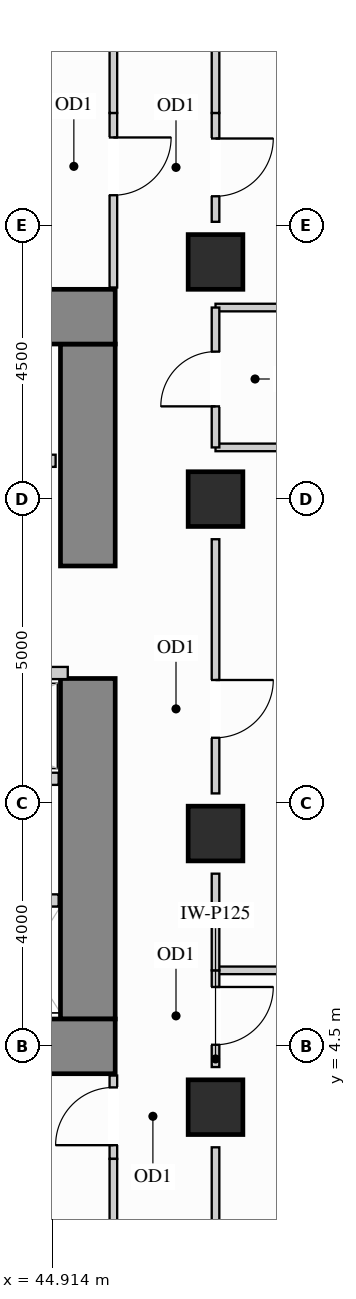
"""IFC4 building model, lengths in metres.
Left out: names, types, materials, properties, quantities, classifications, styles, units other than length and angle.
Written with IfcOpenShell. Run it as: python <this file> out.ifc"""

import sys

from ifc_helpers import new_model, si_unit, direction, frame, frame_2d, origin, origin_2d, place, context, subcontext, project, spatial, rectangle, extrude, source, transform, mapped, element, fill, save


model = new_model("IFC4")
c1 = context("Model", 3, precision=1e-05, world=origin(), true_north=direction((0.0, 1.0)))
c2 = subcontext(c1, "Body", "Model", "MODEL_VIEW")
j1 = project(units=[si_unit("LENGTHUNIT", "METRE"), si_unit("PLANEANGLEUNIT", "RADIAN")], contexts=[c1])
p1 = place(None, origin())
s1 = spatial("IfcSite", under=j1, at=p1, CompositionType="ELEMENT")
p2 = place(p1, origin())
s2 = spatial("IfcBuilding", under=s1, at=p2, CompositionType="ELEMENT")
p3 = place(p2, frame((0.0, 0.0, 54.9)))
s3 = spatial("IfcBuildingStorey", under=s2, at=p3, CompositionType="ELEMENT", Elevation=54.9)
m1 = source(origin(), c2, "Body", "SweptSolid", [
    extrude(rectangle(XDim=0.9, YDim=0.9, at=origin_2d()), origin(), (0.0, 0.0, 1.0), 3.38),
])
for number, where, z_axis, x_axis in (
    (1, (47.6, 13.5, 0.0), (0.0, 0.0, 1.0), (1.0, 0.0, 0.0)),
    (2, (47.6, 3.5, 0.0), (0.0, 0.0, 1.0), (1.0, 0.0, 0.0)),
    (3, (47.6, 8.0, 0.0), (0.0, 0.0, 1.0), (1.0, 0.0, 0.0)),
    (4, (47.6, 17.4, 0.0), (0.0, 0.0, 1.0), (1.0, 0.0, 0.0)),
):
    element("IfcColumn", number, at=place(p3, frame(where, z_axis=z_axis, x_axis=x_axis)), inside=s3, PredefinedType="COLUMN", context=c2, shape_type="MappedRepresentation", body=[
        mapped(m1, transform((0.0, 0.0, 0.0), x_axis=(1.0, 0.0, 0.0), y_axis=(0.0, 1.0, 0.0), z_axis=(0.0, 0.0, 1.0))),
    ])
m2 = source(origin(), c2, "Body", "SweptSolid", [
    extrude(rectangle(XDim=5.6, YDim=0.9, at=frame_2d((2.8, 0.0))), origin(), (0.0, 0.0, 1.0), 3.38),
])
p4 = place(p3, frame((45.5, 4.95, 0.0), z_axis=(0.0, 0.0, 1.0), x_axis=(0.0, 1.0, 0.0)))
e5 = element("IfcWall", 5, at=p4, inside=s3, PredefinedType="SHEAR", context=c2, shape_type="MappedRepresentation", body=[
    mapped(m2, transform((0.0, 0.0, 0.0), x_axis=(1.0, 0.0, 0.0), y_axis=(0.0, 1.0, 0.0), z_axis=(0.0, 0.0, 1.0))),
])
m3 = source(origin(), c2, "Body", "SweptSolid", [
    extrude(rectangle(XDim=3.65, YDim=0.9, at=frame_2d((1.825, 0.0))), origin(), (0.0, 0.0, 1.0), 3.38),
])
p5 = place(p3, frame((45.5, 12.4, 0.0), z_axis=(0.0, 0.0, 1.0), x_axis=(0.0, 1.0, 0.0)))
e6 = element("IfcWall", 6, at=p5, inside=s3, PredefinedType="SHEAR", context=c2, shape_type="MappedRepresentation", body=[
    mapped(m3, transform((0.0, 0.0, 0.0), x_axis=(1.0, 0.0, 0.0), y_axis=(0.0, 1.0, 0.0), z_axis=(0.0, 0.0, 1.0))),
])
m4 = source(origin(), c2, "Body", "SweptSolid", [
    extrude(rectangle(XDim=10.4, YDim=0.9, at=frame_2d((5.2, 0.0))), origin(), (0.0, 0.0, 1.0), 3.38),
])
for number, where, z_axis, x_axis in (
    (7, (35.55, 16.5, 0.0), (0.0, 0.0, 1.0), (1.0, 0.0, 0.0)),
    (8, (35.55, 4.5, 0.0), (0.0, 0.0, 1.0), (1.0, 0.0, 0.0)),
):
    element("IfcWall", number, at=place(p3, frame(where, z_axis=z_axis, x_axis=x_axis)), inside=s3, PredefinedType="SHEAR", context=c2, shape_type="MappedRepresentation", body=[
        mapped(m4, transform((0.0, 0.0, 0.0), x_axis=(1.0, 0.0, 0.0), y_axis=(0.0, 1.0, 0.0), z_axis=(0.0, 0.0, 1.0))),
    ])
m5 = source(origin(), c2, "Body", "SweptSolid", [
    extrude(rectangle(XDim=11.048, YDim=0.125, at=frame_2d((5.524, 0.0))), origin(), (0.0, 0.0, 1.0), 3.365),
])
p6 = place(p3, frame((47.6, 14.35, 0.0), z_axis=(0.0, 0.0, 1.0), x_axis=(1.0, 0.0, 0.0)))
e9 = element("IfcWall", 9, at=p6, inside=s3, PredefinedType="PARTITIONING", context=c2, shape_type="MappedRepresentation", body=[
    mapped(m5, transform((0.0, 0.0, 0.0), x_axis=(1.0, 0.0, 0.0), y_axis=(0.0, 1.0, 0.0), z_axis=(0.0, 0.0, 1.0))),
])
m6 = source(origin(), c2, "Body", "SweptSolid", [
    extrude(rectangle(XDim=11.048, YDim=0.125, at=frame_2d((5.524, 0.0))), origin(), (0.0, 0.0, 1.0), 2.67),
])
p7 = place(p3, frame((47.6, 16.65, 0.0), z_axis=(0.0, 0.0, 1.0), x_axis=(1.0, 0.0, 0.0)))
e10 = element("IfcWall", 10, at=p7, inside=s3, PredefinedType="PARTITIONING", context=c2, shape_type="MappedRepresentation", body=[
    mapped(m6, transform((0.0, 0.0, 0.0), x_axis=(1.0, 0.0, 0.0), y_axis=(0.0, 1.0, 0.0), z_axis=(0.0, 0.0, 1.0))),
])
p8 = place(p3, frame((47.6, 5.75, 0.0), z_axis=(0.0, 0.0, 1.0), x_axis=(1.0, 0.0, 0.0)))
e11 = element("IfcWall", 11, at=p8, inside=s3, PredefinedType="PARTITIONING", context=c2, shape_type="MappedRepresentation", body=[
    mapped(m5, transform((0.0, 0.0, 0.0), x_axis=(1.0, 0.0, 0.0), y_axis=(0.0, 1.0, 0.0), z_axis=(0.0, 0.0, 1.0))),
])
p9 = place(p3, frame((47.6, 4.16, 0.0), z_axis=(0.0, 0.0, 1.0), x_axis=(0.0, 1.0, 0.0)))
e12 = element("IfcWall", 12, at=p9, inside=s3, PredefinedType="PARTITIONING", context=c2, shape_type="SweptSolid", body=[
    extrude(rectangle(XDim=1.59, YDim=0.125, at=frame_2d((0.795, 0.0))), origin(), (0.0, 0.0, 1.0), 2.67),
])
p10 = place(p9, frame((0.367, 0.0, 0.0)))
e13 = element("IfcOpeningElement", 13, at=p10, cuts=e12, PredefinedType="OPENING", context=c2, shape_type="SweptSolid", body=[
    extrude(rectangle(XDim=0.95, YDim=2.15, at=frame_2d((0.475, 1.075))), frame((0.0, 0.073, 0.0), z_axis=(0.0, -1.0, 0.0), x_axis=(1.0, 0.0, 0.0)), (0.0, 0.0, 1.0), 0.145),
])
m7 = source(origin(), c2, "Body", "SweptSolid", [
    extrude(rectangle(XDim=1.58, YDim=0.125, at=frame_2d((0.79, 0.0))), origin(), (0.0, 0.0, 1.0), 2.67),
])
p11 = place(p3, frame((47.6, 1.26, 0.0), z_axis=(0.0, 0.0, 1.0), x_axis=(0.0, 1.0, 0.0)))
e14 = element("IfcWall", 14, at=p11, inside=s3, PredefinedType="PARTITIONING", context=c2, shape_type="MappedRepresentation", body=[
    mapped(m7, transform((0.0, 0.0, 0.0), x_axis=(1.0, 0.0, 0.0), y_axis=(0.0, 1.0, 0.0), z_axis=(0.0, 0.0, 1.0))),
])
m8 = source(origin(), c2, "Body", "SweptSolid", [
    extrude(rectangle(XDim=1.59, YDim=0.125, at=frame_2d((0.795, 0.0))), origin(), (0.0, 0.0, 1.0), 2.67),
])
p12 = place(p3, frame((47.6, 5.75, 0.0), z_axis=(0.0, 0.0, 1.0), x_axis=(0.0, 1.0, 0.0)))
e15 = element("IfcWall", 15, at=p12, inside=s3, PredefinedType="PARTITIONING", context=c2, shape_type="MappedRepresentation", body=[
    mapped(m8, transform((0.0, 0.0, 0.0), x_axis=(1.0, 0.0, 0.0), y_axis=(0.0, 1.0, 0.0), z_axis=(0.0, 0.0, 1.0))),
])
p13 = place(p3, frame((47.6, 8.66, 0.0), z_axis=(0.0, 0.0, 1.0), x_axis=(0.0, 1.0, 0.0)))
e16 = element("IfcWall", 16, at=p13, inside=s3, PredefinedType="PARTITIONING", context=c2, shape_type="SweptSolid", body=[
    extrude(rectangle(XDim=4.18, YDim=0.125, at=frame_2d((2.09, 0.0))), origin(), (0.0, 0.0, 1.0), 2.67),
])
p14 = place(p13, frame((0.915, 0.0, 0.0)))
e17 = element("IfcOpeningElement", 17, at=p14, cuts=e16, PredefinedType="OPENING", context=c2, shape_type="SweptSolid", body=[
    extrude(rectangle(XDim=0.95, YDim=2.15, at=frame_2d((0.475, 1.075))), frame((0.0, 0.073, 0.0), z_axis=(0.0, -1.0, 0.0), x_axis=(1.0, 0.0, 0.0)), (0.0, 0.0, 1.0), 0.145),
])
p15 = place(p3, frame((47.6, 18.06, 0.0), z_axis=(0.0, 0.0, 1.0), x_axis=(0.0, 1.0, 0.0)))
e18 = element("IfcWall", 18, at=p15, inside=s3, PredefinedType="PARTITIONING", context=c2, shape_type="SweptSolid", body=[
    extrude(rectangle(XDim=1.79, YDim=0.125, at=frame_2d((0.895, 0.0))), origin(), (0.0, 0.0, 1.0), 2.67),
])
p16 = place(p15, frame((0.42, 0.0, 0.0)))
e19 = element("IfcOpeningElement", 19, at=p16, cuts=e18, PredefinedType="OPENING", context=c2, shape_type="SweptSolid", body=[
    extrude(rectangle(XDim=0.95, YDim=2.15, at=frame_2d((0.475, 1.075))), frame((0.0, 0.073, 0.0), z_axis=(0.0, -1.0, 0.0), x_axis=(1.0, 0.0, 0.0)), (0.0, 0.0, 1.0), 0.145),
])
m9 = source(origin(), c2, "Body", "SweptSolid", [
    extrude(rectangle(XDim=1.39, YDim=0.125, at=frame_2d((0.695, 0.0))), origin(), (0.0, 0.0, 1.0), 2.67),
])
p17 = place(p3, frame((47.6, 19.85, 0.0), z_axis=(0.0, 0.0, 1.0), x_axis=(0.0, 1.0, 0.0)))
e20 = element("IfcWall", 20, at=p17, inside=s3, PredefinedType="PARTITIONING", context=c2, shape_type="MappedRepresentation", body=[
    mapped(m9, transform((0.0, 0.0, 0.0), x_axis=(1.0, 0.0, 0.0), y_axis=(0.0, 1.0, 0.0), z_axis=(0.0, 0.0, 1.0))),
])
p18 = place(p3, frame((47.6, 14.35, 0.0), z_axis=(0.0, 0.0, 1.0), x_axis=(0.0, 1.0, 0.0)))
e21 = element("IfcWall", 21, at=p18, inside=s3, PredefinedType="PARTITIONING", context=c2, shape_type="SweptSolid", body=[
    extrude(rectangle(XDim=2.3, YDim=0.125, at=frame_2d((1.15, 0.0))), origin(), (0.0, 0.0, 1.0), 2.67),
])
p19 = place(p18, frame((0.675, 0.0, 0.0)))
e22 = element("IfcOpeningElement", 22, at=p19, cuts=e21, PredefinedType="OPENING", context=c2, shape_type="SweptSolid", body=[
    extrude(rectangle(XDim=0.9, YDim=2.15, at=frame_2d((0.45, 1.075))), frame((0.0, 0.073, 0.0), z_axis=(0.0, -1.0, 0.0), x_axis=(1.0, 0.0, 0.0)), (0.0, 0.0, 1.0), 0.145),
])
p20 = place(p3, frame((45.92, 16.98, 0.0), z_axis=(0.0, 0.0, 1.0), x_axis=(0.0, 1.0, 0.0)))
e23 = element("IfcWall", 23, at=p20, inside=s3, PredefinedType="PARTITIONING", context=c2, shape_type="SweptSolid", body=[
    extrude(rectangle(XDim=2.87, YDim=0.125, at=frame_2d((1.435, 0.0))), origin(), (0.0, 0.0, 1.0), 3.365),
])
p21 = place(p20, frame((1.517, 0.0, 0.0)))
e24 = element("IfcOpeningElement", 24, at=p21, cuts=e23, PredefinedType="OPENING", context=c2, shape_type="SweptSolid", body=[
    extrude(rectangle(XDim=0.95, YDim=2.15, at=frame_2d((0.475, 1.075))), frame((0.0, 0.073, 0.0), z_axis=(0.0, -1.0, 0.0), x_axis=(1.0, 0.0, 0.0)), (0.0, 0.0, 1.0), 0.145),
])
m10 = source(origin(), c2, "Body", "SweptSolid", [
    extrude(rectangle(XDim=2.298, YDim=0.125, at=frame_2d((1.149, 0.0))), origin(), (0.0, 0.0, 1.0), 3.365),
])
p22 = place(p3, frame((45.92, 19.85, 0.0), z_axis=(0.0, 0.0, 1.0), x_axis=(0.0, 1.0, 0.0)))
e25 = element("IfcWall", 25, at=p22, inside=s3, PredefinedType="PARTITIONING", context=c2, shape_type="MappedRepresentation", body=[
    mapped(m10, transform((0.0, 0.0, 0.0), x_axis=(1.0, 0.0, 0.0), y_axis=(0.0, 1.0, 0.0), z_axis=(0.0, 0.0, 1.0))),
])
p23 = place(p3, frame((45.92, 2.65, 0.0), z_axis=(0.0, 0.0, 1.0), x_axis=(0.0, 1.0, 0.0)))
e26 = element("IfcWall", 26, at=p23, inside=s3, PredefinedType="PARTITIONING", context=c2, shape_type="SweptSolid", body=[
    extrude(rectangle(XDim=1.37, YDim=0.125, at=frame_2d((0.685, 0.0))), origin(), (0.0, 0.0, 1.0), 3.365),
])
p24 = place(p23, frame((0.225, 0.0, 0.0)))
e27 = element("IfcOpeningElement", 27, at=p24, cuts=e26, PredefinedType="OPENING", context=c2, shape_type="SweptSolid", body=[
    extrude(rectangle(XDim=0.95, YDim=2.15, at=frame_2d((0.475, 1.075))), frame((0.0, 0.073, 0.0), z_axis=(0.0, -1.0, 0.0), x_axis=(1.0, 0.0, 0.0)), (0.0, 0.0, 1.0), 0.145),
])
p25 = place(p3, frame((45.92, 0.352, 0.0), z_axis=(0.0, 0.0, 1.0), x_axis=(0.0, 1.0, 0.0)))
e28 = element("IfcWall", 28, at=p25, inside=s3, PredefinedType="PARTITIONING", context=c2, shape_type="MappedRepresentation", body=[
    mapped(m10, transform((0.0, 0.0, 0.0), x_axis=(1.0, 0.0, 0.0), y_axis=(0.0, 1.0, 0.0), z_axis=(0.0, 0.0, 1.0))),
])
m11 = source(origin(), c2, "Body", "SweptSolid", [
    extrude(rectangle(XDim=1.17, YDim=0.2, at=frame_2d((0.585, 0.0))), origin(), (0.0, 0.0, 1.0), 3.365),
])
p26 = place(p3, frame((43.85, 6.9, 0.0), z_axis=(0.0, 0.0, 1.0), x_axis=(1.0, 0.0, 0.0)))
e29 = element("IfcWall", 29, at=p26, inside=s3, PredefinedType="PARTITIONING", context=c2, shape_type="MappedRepresentation", body=[
    mapped(m11, transform((0.0, 0.0, 0.0), x_axis=(1.0, 0.0, 0.0), y_axis=(0.0, 1.0, 0.0), z_axis=(0.0, 0.0, 1.0))),
])
p27 = place(p3, frame((42.23, 14.13, 0.0), z_axis=(0.0, 0.0, 1.0), x_axis=(1.0, 0.0, 0.0)))
e30 = element("IfcWall", 30, at=p27, inside=s3, PredefinedType="PARTITIONING", context=c2, shape_type="SweptSolid", body=[
    extrude(rectangle(XDim=2.74, YDim=0.2, at=frame_2d((1.37, 0.0))), origin(), (0.0, 0.0, 1.0), 3.365),
])
p28 = place(p27, frame((0.82, 0.0, 0.0)))
e31 = element("IfcOpeningElement", 31, at=p28, cuts=e30, PredefinedType="OPENING", context=c2, shape_type="SweptSolid", body=[
    extrude(rectangle(XDim=1.1, YDim=2.2, at=frame_2d((0.55, 1.1))), frame((0.0, 0.11, 0.0), z_axis=(0.0, -1.0, 0.0), x_axis=(1.0, 0.0, 0.0)), (0.0, 0.0, 1.0), 0.22),
])
m12 = source(origin(), c2, "Body", "SweptSolid", [
    extrude(rectangle(XDim=3.49, YDim=0.2, at=frame_2d((1.745, 0.0))), origin(), (0.0, 0.0, 1.0), 3.365),
])
p29 = place(p3, frame((41.68, 10.64, 0.0), z_axis=(0.0, 0.0, 1.0), x_axis=(1.0, 0.0, 0.0)))
e32 = element("IfcWall", 32, at=p29, inside=s3, PredefinedType="PARTITIONING", context=c2, shape_type="MappedRepresentation", body=[
    mapped(m12, transform((0.0, 0.0, 0.0), x_axis=(1.0, 0.0, 0.0), y_axis=(0.0, 1.0, 0.0), z_axis=(0.0, 0.0, 1.0))),
])
m13 = source(origin(), c2, "Body", "SweptSolid", [
    extrude(rectangle(XDim=3.34, YDim=0.2, at=frame_2d((1.67, 0.0))), origin(), (0.0, 0.0, 1.0), 3.365),
])
p30 = place(p3, frame((41.68, 8.9, 0.0), z_axis=(0.0, 0.0, 1.0), x_axis=(1.0, 0.0, 0.0)))
e33 = element("IfcWall", 33, at=p30, inside=s3, PredefinedType="PARTITIONING", context=c2, shape_type="MappedRepresentation", body=[
    mapped(m13, transform((0.0, 0.0, 0.0), x_axis=(1.0, 0.0, 0.0), y_axis=(0.0, 1.0, 0.0), z_axis=(0.0, 0.0, 1.0))),
])
m14 = source(origin(), c2, "Body", "SweptSolid", [
    extrude(rectangle(XDim=0.95, YDim=2.15, at=frame_2d((0.475, 1.075))), frame((0.0, 0.025, 0.0), z_axis=(0.0, -1.0, 0.0), x_axis=(1.0, 0.0, 0.0)), (0.0, 0.0, 1.0), 0.05),
])
p31 = place(p21, origin())
e34 = element("IfcDoor", 34, at=p31, inside=s3, OperationType="SINGLE_SWING_RIGHT", PredefinedType="DOOR", context=c2, shape_type="MappedRepresentation", body=[
    mapped(m14, transform((0.0, 0.0, 0.0), x_axis=(1.0, 0.0, 0.0), y_axis=(0.0, 1.0, 0.0), z_axis=(0.0, 0.0, 1.0))),
])
fill(e24, e34)
p32 = place(p24, origin())
e35 = element("IfcDoor", 35, at=p32, inside=s3, OperationType="SINGLE_SWING_LEFT", PredefinedType="DOOR", context=c2, shape_type="MappedRepresentation", body=[
    mapped(m14, transform((0.0, 0.0, 0.0), x_axis=(1.0, 0.0, 0.0), y_axis=(0.0, 1.0, 0.0), z_axis=(0.0, 0.0, 1.0))),
])
fill(e27, e35)
p33 = place(p10, origin())
e36 = element("IfcDoor", 36, at=p33, inside=s3, OperationType="SINGLE_SWING_RIGHT", PredefinedType="DOOR", context=c2, shape_type="MappedRepresentation", body=[
    mapped(m14, transform((0.0, 0.0, 0.0), x_axis=(1.0, 0.0, 0.0), y_axis=(0.0, 1.0, 0.0), z_axis=(0.0, 0.0, 1.0))),
])
fill(e13, e36)
p34 = place(p14, origin())
e37 = element("IfcDoor", 37, at=p34, inside=s3, OperationType="SINGLE_SWING_RIGHT", PredefinedType="DOOR", context=c2, shape_type="MappedRepresentation", body=[
    mapped(m14, transform((0.0, 0.0, 0.0), x_axis=(1.0, 0.0, 0.0), y_axis=(0.0, 1.0, 0.0), z_axis=(0.0, 0.0, 1.0))),
])
fill(e17, e37)
p35 = place(p16, origin())
e38 = element("IfcDoor", 38, at=p35, inside=s3, OperationType="SINGLE_SWING_RIGHT", PredefinedType="DOOR", context=c2, shape_type="MappedRepresentation", body=[
    mapped(m14, transform((0.0, 0.0, 0.0), x_axis=(1.0, 0.0, 0.0), y_axis=(0.0, 1.0, 0.0), z_axis=(0.0, 0.0, 1.0))),
])
fill(e19, e38)
m15 = source(origin(), c2, "Body", "SweptSolid", [
    extrude(rectangle(XDim=0.9, YDim=2.15, at=frame_2d((0.45, 1.075))), frame((0.0, 0.025, 0.0), z_axis=(0.0, -1.0, 0.0), x_axis=(1.0, 0.0, 0.0)), (0.0, 0.0, 1.0), 0.05),
])
p36 = place(p19, origin())
e39 = element("IfcDoor", 39, at=p36, inside=s3, OperationType="SINGLE_SWING_LEFT", PredefinedType="DOOR", context=c2, shape_type="MappedRepresentation", body=[
    mapped(m15, transform((0.0, 0.0, 0.0), x_axis=(1.0, 0.0, 0.0), y_axis=(0.0, 1.0, 0.0), z_axis=(0.0, 0.0, 1.0))),
])
fill(e22, e39)
save(model, sys.argv[1])
